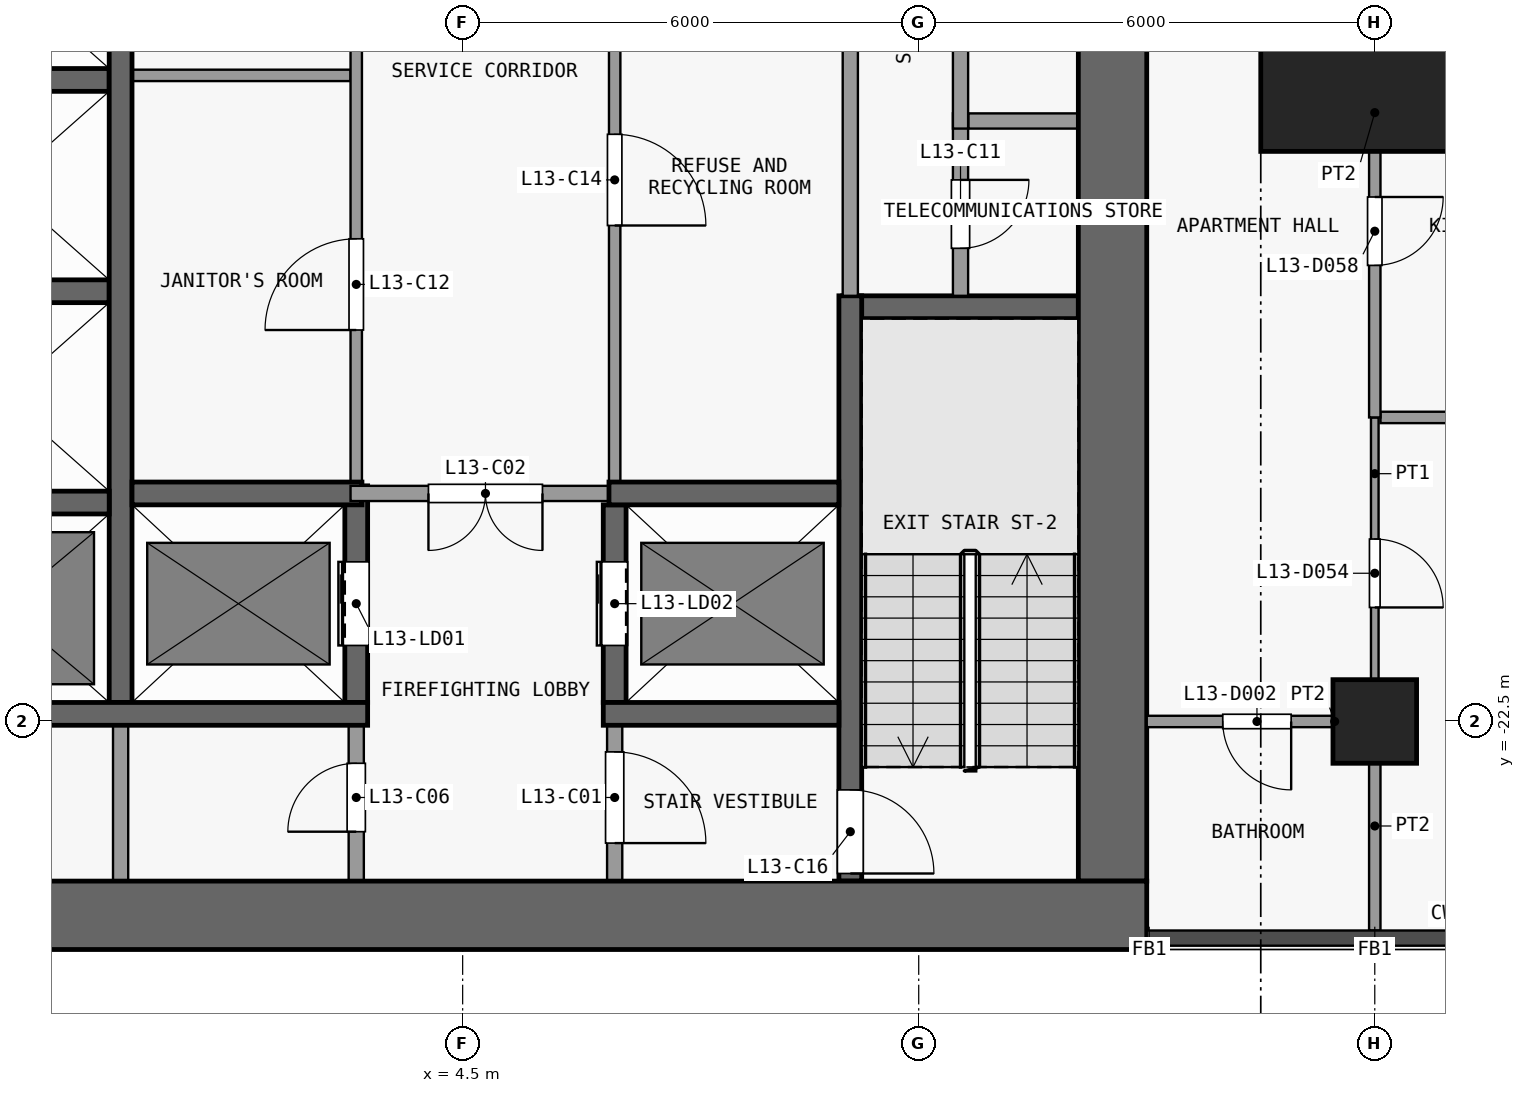
"""IFC4 building model, lengths in metres.
Left out: names, types, materials, properties, quantities, classifications, styles, units other than length and angle.
Written with IfcOpenShell. Run it as: python <this file> out.ifc"""

import sys

from ifc_helpers import new_model, si_unit, direction, frame, frame_2d, origin, origin_2d, place, context, subcontext, project, spatial, rectangle, extrude, element, fill, save


model = new_model("IFC4")
c1 = context("Model", 3, precision=1e-05, world=origin(), true_north=direction((0.0, 1.0)))
c2 = subcontext(c1, "Body", "Model", "MODEL_VIEW")
j1 = project(units=[si_unit("LENGTHUNIT", "METRE"), si_unit("PLANEANGLEUNIT", "RADIAN")], contexts=[c1])
p1 = place(None, origin())
s1 = spatial("IfcSite", under=j1, at=p1, CompositionType="ELEMENT")
p2 = place(p1, origin())
s2 = spatial("IfcBuilding", under=s1, at=p2, CompositionType="ELEMENT")
p3 = place(p2, frame((0.0, 0.0, 57.7)))
s3 = spatial("IfcBuildingStorey", under=s2, at=p3, CompositionType="ELEMENT", Elevation=57.7)
p4 = place(p3, frame((16.5, -22.5, 0.0), z_axis=(0.0, 0.0, 1.0), x_axis=(1.0, 0.0, 0.0)))
e1 = element("IfcColumn", 1, at=p4, inside=s3, PredefinedType="COLUMN", context=c2, shape_type="SweptSolid", body=[
    extrude(rectangle(XDim=1.1, YDim=1.1, at=origin_2d()), origin(), (0.0, 0.0, 1.0), 3.6),
])
p5 = place(p3, frame((16.5, -13.5, 0.0), z_axis=(0.0, 0.0, 1.0), x_axis=(1.0, 0.0, 0.0)))
e2 = element("IfcColumn", 2, at=p5, inside=s3, PredefinedType="COLUMN", context=c2, shape_type="SweptSolid", body=[
    extrude(rectangle(XDim=3.0, YDim=3.0, at=origin_2d()), origin(), (0.0, 0.0, 1.0), 3.6),
])
p6 = place(p3, frame((-13.5, -25.05, 0.0), z_axis=(0.0, 0.0, 1.0), x_axis=(1.0, 0.0, 0.0)))
e3 = element("IfcWall", 3, at=p6, inside=s3, PredefinedType="SHEAR", context=c2, shape_type="SweptSolid", body=[
    extrude(rectangle(XDim=27.0, YDim=0.9, at=frame_2d((13.5, 0.0))), origin(), (0.0, 0.0, 1.0), 3.3),
])
p7 = place(p3, frame((13.05, -24.6, 0.0), z_axis=(0.0, 0.0, 1.0), x_axis=(0.0, 1.0, 0.0)))
e4 = element("IfcWall", 4, at=p7, inside=s3, PredefinedType="SHEAR", context=c2, shape_type="SweptSolid", body=[
    extrude(rectangle(XDim=16.1, YDim=0.9, at=frame_2d((8.05, 0.0))), origin(), (0.0, 0.0, 1.0), 3.3),
])
p8 = place(p3, frame((-2.95, -22.4, 0.0), z_axis=(0.0, 0.0, 1.0), x_axis=(1.0, 0.0, 0.0)))
e5 = element("IfcWall", 5, at=p8, inside=s3, PredefinedType="SHEAR", context=c2, shape_type="SweptSolid", body=[
    extrude(rectangle(XDim=6.2, YDim=0.3, at=frame_2d((3.1, 0.0))), origin(), (0.0, 0.0, 1.0), 3.3),
])
p9 = place(p3, frame((6.35, -22.4, 0.0), z_axis=(0.0, 0.0, 1.0), x_axis=(1.0, 0.0, 0.0)))
e6 = element("IfcWall", 6, at=p9, inside=s3, PredefinedType="SHEAR", context=c2, shape_type="SweptSolid", body=[
    extrude(rectangle(XDim=3.1, YDim=0.3, at=frame_2d((1.55, 0.0))), origin(), (0.0, 0.0, 1.0), 3.3),
])
p10 = place(p3, frame((-2.95, -19.62, 0.0), z_axis=(0.0, 0.0, 1.0), x_axis=(1.0, 0.0, 0.0)))
e7 = element("IfcWall", 7, at=p10, inside=s3, PredefinedType="SHEAR", context=c2, shape_type="SweptSolid", body=[
    extrude(rectangle(XDim=2.8, YDim=0.3, at=frame_2d((1.4, 0.0))), origin(), (0.0, 0.0, 1.0), 3.3),
])
p11 = place(p3, frame((0.15, -19.5, 0.0), z_axis=(0.0, 0.0, 1.0), x_axis=(1.0, 0.0, 0.0)))
e8 = element("IfcWall", 8, at=p11, inside=s3, PredefinedType="SHEAR", context=c2, shape_type="SweptSolid", body=[
    extrude(rectangle(XDim=3.025, YDim=0.3, at=frame_2d((1.513, 0.0))), origin(), (0.0, 0.0, 1.0), 3.3),
])
p12 = place(p3, frame((6.575, -19.5, 0.0), z_axis=(0.0, 0.0, 1.0), x_axis=(-1.0, 0.0, 0.0)))
e9 = element("IfcWall", 9, at=p12, inside=s3, PredefinedType="PARTITIONING", context=c2, shape_type="SweptSolid", body=[
    extrude(rectangle(XDim=3.55, YDim=0.2, at=frame_2d((1.775, 0.0))), origin(), (0.0, 0.0, 1.0), 3.3),
])
p13 = place(p12, frame((1.025, 0.0, 0.0)))
e10 = element("IfcOpeningElement", 10, at=p13, cuts=e9, PredefinedType="OPENING", context=c2, shape_type="SweptSolid", body=[
    extrude(rectangle(XDim=1.5, YDim=2.1, at=frame_2d((0.75, 1.05))), frame((0.0, 0.11, 0.0), z_axis=(0.0, -1.0, 0.0), x_axis=(1.0, 0.0, 0.0)), (0.0, 0.0, 1.0), 0.22),
])
p14 = place(p3, frame((6.425, -19.5, 0.0), z_axis=(0.0, 0.0, 1.0), x_axis=(1.0, 0.0, 0.0)))
e11 = element("IfcWall", 11, at=p14, inside=s3, PredefinedType="SHEAR", context=c2, shape_type="SweptSolid", body=[
    extrude(rectangle(XDim=3.025, YDim=0.3, at=frame_2d((1.512, 0.0))), origin(), (0.0, 0.0, 1.0), 3.3),
])
p15 = place(p3, frame((9.5, -17.05, 0.0), z_axis=(0.0, 0.0, 1.0), x_axis=(1.0, 0.0, 0.0)))
e12 = element("IfcWall", 12, at=p15, inside=s3, PredefinedType="SHEAR", context=c2, shape_type="SweptSolid", body=[
    extrude(rectangle(XDim=3.1, YDim=0.3, at=frame_2d((1.55, 0.0))), origin(), (0.0, 0.0, 1.0), 3.3),
])
p16 = place(p3, frame((-2.95, -16.84, 0.0), z_axis=(0.0, 0.0, 1.0), x_axis=(1.0, 0.0, 0.0)))
e13 = element("IfcWall", 13, at=p16, inside=s3, PredefinedType="SHEAR", context=c2, shape_type="SweptSolid", body=[
    extrude(rectangle(XDim=2.8, YDim=0.3, at=frame_2d((1.4, 0.0))), origin(), (0.0, 0.0, 1.0), 3.3),
])
p17 = place(p3, frame((11.15, -14.6, 0.0), z_axis=(0.0, 0.0, 1.0), x_axis=(1.0, 0.0, 0.0)))
e14 = element("IfcWall", 14, at=p17, inside=s3, PredefinedType="PARTITIONING", context=c2, shape_type="SweptSolid", body=[
    extrude(rectangle(XDim=1.45, YDim=0.2, at=frame_2d((0.725, 0.0))), origin(), (0.0, 0.0, 1.0), 3.3),
])
p18 = place(p3, frame((-2.95, -14.06, 0.0), z_axis=(0.0, 0.0, 1.0), x_axis=(1.0, 0.0, 0.0)))
e15 = element("IfcWall", 15, at=p18, inside=s3, PredefinedType="SHEAR", context=c2, shape_type="SweptSolid", body=[
    extrude(rectangle(XDim=2.8, YDim=0.3, at=frame_2d((1.4, 0.0))), origin(), (0.0, 0.0, 1.0), 3.3),
])
p19 = place(p3, frame((0.15, -14.0, 0.0), z_axis=(0.0, 0.0, 1.0), x_axis=(1.0, 0.0, 0.0)))
e16 = element("IfcWall", 16, at=p19, inside=s3, PredefinedType="PARTITIONING", context=c2, shape_type="SweptSolid", body=[
    extrude(rectangle(XDim=2.875, YDim=0.15, at=frame_2d((1.438, 0.0))), origin(), (0.0, 0.0, 1.0), 3.3),
])
p20 = place(p3, frame((0.0, -24.6, 0.0), z_axis=(0.0, 0.0, 1.0), x_axis=(0.0, 1.0, 0.0)))
e17 = element("IfcWall", 17, at=p20, inside=s3, PredefinedType="PARTITIONING", context=c2, shape_type="SweptSolid", body=[
    extrude(rectangle(XDim=2.05, YDim=0.2, at=frame_2d((1.025, 0.0))), origin(), (0.0, 0.0, 1.0), 3.3),
])
p21 = place(p3, frame((0.0, -22.25, 0.0), z_axis=(0.0, 0.0, 1.0), x_axis=(0.0, 1.0, 0.0)))
e18 = element("IfcWall", 18, at=p21, inside=s3, PredefinedType="SHEAR", context=c2, shape_type="SweptSolid", body=[
    extrude(rectangle(XDim=13.75, YDim=0.3, at=frame_2d((6.875, 0.0))), origin(), (0.0, 0.0, 1.0), 3.3),
])
p22 = place(p3, frame((3.1, -24.6, 0.0), z_axis=(0.0, 0.0, 1.0), x_axis=(0.0, 1.0, 0.0)))
e19 = element("IfcWall", 19, at=p22, inside=s3, PredefinedType="PARTITIONING", context=c2, shape_type="SweptSolid", body=[
    extrude(rectangle(XDim=2.05, YDim=0.2, at=frame_2d((1.025, 0.0))), origin(), (0.0, 0.0, 1.0), 3.3),
])
p23 = place(p22, frame((0.65, 0.0, 0.0)))
e20 = element("IfcOpeningElement", 20, at=p23, cuts=e19, PredefinedType="OPENING", context=c2, shape_type="SweptSolid", body=[
    extrude(rectangle(XDim=0.9, YDim=2.1, at=frame_2d((0.45, 1.05))), frame((0.0, 0.11, 0.0), z_axis=(0.0, -1.0, 0.0), x_axis=(1.0, 0.0, 0.0)), (0.0, 0.0, 1.0), 0.22),
])
p24 = place(p3, frame((3.1, -22.25, 0.0), z_axis=(0.0, 0.0, 1.0), x_axis=(0.0, 1.0, 0.0)))
e21 = element("IfcWall", 21, at=p24, inside=s3, PredefinedType="SHEAR", context=c2, shape_type="SweptSolid", body=[
    extrude(rectangle(XDim=2.85, YDim=0.3, at=frame_2d((1.425, 0.0))), origin(), (0.0, 0.0, 1.0), 3.3),
])
p25 = place(p24, frame((0.75, 0.0, 0.0)))
e22 = element("IfcOpeningElement", 22, at=p25, cuts=e21, PredefinedType="OPENING", context=c2, shape_type="SweptSolid", body=[
    extrude(rectangle(XDim=1.1, YDim=2.1, at=frame_2d((0.55, 1.05))), frame((0.0, 0.16, 0.0), z_axis=(0.0, -1.0, 0.0), x_axis=(1.0, 0.0, 0.0)), (0.0, 0.0, 1.0), 0.32),
])
p26 = place(p3, frame((3.1, -19.4, 0.0), z_axis=(0.0, 0.0, 1.0), x_axis=(0.0, 1.0, 0.0)))
e23 = element("IfcWall", 23, at=p26, inside=s3, PredefinedType="PARTITIONING", context=c2, shape_type="SweptSolid", body=[
    extrude(rectangle(XDim=10.9, YDim=0.15, at=frame_2d((5.45, 0.0))), origin(), (0.0, 0.0, 1.0), 3.3),
])
p27 = place(p26, frame((2.05, 0.0, 0.0)))
e24 = element("IfcOpeningElement", 24, at=p27, cuts=e23, PredefinedType="OPENING", context=c2, shape_type="SweptSolid", body=[
    extrude(rectangle(XDim=1.2, YDim=2.1, at=frame_2d((0.6, 1.05))), frame((0.0, 0.085, 0.0), z_axis=(0.0, -1.0, 0.0), x_axis=(1.0, 0.0, 0.0)), (0.0, 0.0, 1.0), 0.17),
])
p28 = place(p26, frame((7.55, 0.0, 0.0)))
e25 = element("IfcOpeningElement", 25, at=p28, cuts=e23, PredefinedType="OPENING", context=c2, shape_type="SweptSolid", body=[
    extrude(rectangle(XDim=1.2, YDim=2.1, at=frame_2d((0.6, 1.05))), frame((0.0, 0.085, 0.0), z_axis=(0.0, -1.0, 0.0), x_axis=(1.0, 0.0, 0.0)), (0.0, 0.0, 1.0), 0.17),
])
p29 = place(p3, frame((6.5, -22.55, 0.0), z_axis=(0.0, 0.0, 1.0), x_axis=(0.0, -1.0, 0.0)))
e26 = element("IfcWall", 26, at=p29, inside=s3, PredefinedType="PARTITIONING", context=c2, shape_type="SweptSolid", body=[
    extrude(rectangle(XDim=2.05, YDim=0.2, at=frame_2d((1.025, 0.0))), origin(), (0.0, 0.0, 1.0), 3.3),
])
p30 = place(p29, frame((0.35, 0.0, 0.0)))
e27 = element("IfcOpeningElement", 27, at=p30, cuts=e26, PredefinedType="OPENING", context=c2, shape_type="SweptSolid", body=[
    extrude(rectangle(XDim=1.2, YDim=2.1, at=frame_2d((0.6, 1.05))), frame((0.0, 0.11, 0.0), z_axis=(0.0, -1.0, 0.0), x_axis=(1.0, 0.0, 0.0)), (0.0, 0.0, 1.0), 0.22),
])
p31 = place(p3, frame((6.5, -22.25, 0.0), z_axis=(0.0, 0.0, 1.0), x_axis=(0.0, 1.0, 0.0)))
e28 = element("IfcWall", 28, at=p31, inside=s3, PredefinedType="SHEAR", context=c2, shape_type="SweptSolid", body=[
    extrude(rectangle(XDim=2.6, YDim=0.3, at=frame_2d((1.3, 0.0))), origin(), (0.0, 0.0, 1.0), 3.3),
])
p32 = place(p31, frame((0.75, 0.0, 0.0)))
e29 = element("IfcOpeningElement", 29, at=p32, cuts=e28, PredefinedType="OPENING", context=c2, shape_type="SweptSolid", body=[
    extrude(rectangle(XDim=1.1, YDim=2.1, at=frame_2d((0.55, 1.05))), frame((0.0, 0.16, 0.0), z_axis=(0.0, -1.0, 0.0), x_axis=(1.0, 0.0, 0.0)), (0.0, 0.0, 1.0), 0.32),
])
p33 = place(p3, frame((6.5, -11.35, 0.0), z_axis=(0.0, 0.0, 1.0), x_axis=(0.0, -1.0, 0.0)))
e30 = element("IfcWall", 30, at=p33, inside=s3, PredefinedType="PARTITIONING", context=c2, shape_type="SweptSolid", body=[
    extrude(rectangle(XDim=8.0, YDim=0.15, at=frame_2d((4.0, 0.0))), origin(), (0.0, 0.0, 1.0), 3.3),
])
p34 = place(p33, frame((3.425, 0.0, 0.0)))
e31 = element("IfcOpeningElement", 31, at=p34, cuts=e30, PredefinedType="OPENING", context=c2, shape_type="SweptSolid", body=[
    extrude(rectangle(XDim=1.2, YDim=2.1, at=frame_2d((0.6, 1.05))), frame((0.0, 0.085, 0.0), z_axis=(0.0, -1.0, 0.0), x_axis=(1.0, 0.0, 0.0)), (0.0, 0.0, 1.0), 0.17),
])
p35 = place(p3, frame((9.6, -16.9, 0.0), z_axis=(0.0, 0.0, 1.0), x_axis=(0.0, -1.0, 0.0)))
e32 = element("IfcWall", 32, at=p35, inside=s3, PredefinedType="SHEAR", context=c2, shape_type="SweptSolid", body=[
    extrude(rectangle(XDim=7.7, YDim=0.3, at=frame_2d((3.85, 0.0))), origin(), (0.0, 0.0, 1.0), 3.3),
])
p36 = place(p35, frame((6.5, 0.0, 0.0)))
e33 = element("IfcOpeningElement", 33, at=p36, cuts=e32, PredefinedType="OPENING", context=c2, shape_type="SweptSolid", body=[
    extrude(rectangle(XDim=1.1, YDim=2.1, at=frame_2d((0.55, 1.05))), frame((0.0, 0.16, 0.0), z_axis=(0.0, -1.0, 0.0), x_axis=(1.0, 0.0, 0.0)), (0.0, 0.0, 1.0), 0.32),
])
p37 = place(p3, frame((9.6, -16.9, 0.0), z_axis=(0.0, 0.0, 1.0), x_axis=(0.0, 1.0, 0.0)))
e34 = element("IfcWall", 34, at=p37, inside=s3, PredefinedType="PARTITIONING", context=c2, shape_type="SweptSolid", body=[
    extrude(rectangle(XDim=5.75, YDim=0.2, at=frame_2d((2.875, 0.0))), origin(), (0.0, 0.0, 1.0), 3.3),
])
p38 = place(p3, frame((11.05, -14.5, 0.0), z_axis=(0.0, 0.0, 1.0), x_axis=(0.0, -1.0, 0.0)))
e35 = element("IfcWall", 35, at=p38, inside=s3, PredefinedType="PARTITIONING", context=c2, shape_type="SweptSolid", body=[
    extrude(rectangle(XDim=2.4, YDim=0.2, at=frame_2d((1.2, 0.0))), origin(), (0.0, 0.0, 1.0), 3.3),
])
p39 = place(p38, frame((0.875, 0.0, 0.0)))
e36 = element("IfcOpeningElement", 36, at=p39, cuts=e35, PredefinedType="OPENING", context=c2, shape_type="SweptSolid", body=[
    extrude(rectangle(XDim=0.9, YDim=2.1, at=frame_2d((0.45, 1.05))), frame((0.0, 0.11, 0.0), z_axis=(0.0, -1.0, 0.0), x_axis=(1.0, 0.0, 0.0)), (0.0, 0.0, 1.0), 0.22),
])
p40 = place(p3, frame((11.05, -8.5, 0.0), z_axis=(0.0, 0.0, 1.0), x_axis=(0.0, -1.0, 0.0)))
e37 = element("IfcWall", 37, at=p40, inside=s3, PredefinedType="PARTITIONING", context=c2, shape_type="SweptSolid", body=[
    extrude(rectangle(XDim=6.2, YDim=0.2, at=frame_2d((3.1, 0.0))), origin(), (0.0, 0.0, 1.0), 3.3),
])
p41 = place(p40, frame((2.6, 0.0, 0.0)))
e38 = element("IfcOpeningElement", 38, at=p41, cuts=e37, PredefinedType="OPENING", context=c2, shape_type="SweptSolid", body=[
    extrude(rectangle(XDim=0.9, YDim=2.1, at=frame_2d((0.45, 1.05))), frame((0.0, 0.11, 0.0), z_axis=(0.0, -1.0, 0.0), x_axis=(1.0, 0.0, 0.0)), (0.0, 0.0, 1.0), 0.22),
])
p42 = place(p3, frame((13.5, -22.5, 0.0), z_axis=(0.0, 0.0, 1.0), x_axis=(1.0, 0.0, 0.0)))
e39 = element("IfcWall", 39, at=p42, inside=s3, PredefinedType="PARTITIONING", context=c2, shape_type="SweptSolid", body=[
    extrude(rectangle(XDim=2.925, YDim=0.15, at=frame_2d((1.462, 0.0))), origin(), (0.0, 0.0, 1.0), 3.3),
])
p43 = place(p42, frame((1.0, 0.0, 0.0)))
e40 = element("IfcOpeningElement", 40, at=p43, cuts=e39, PredefinedType="OPENING", context=c2, shape_type="SweptSolid", body=[
    extrude(rectangle(XDim=0.9, YDim=2.1, at=frame_2d((0.45, 1.05))), frame((0.0, 0.085, 0.0), z_axis=(0.0, -1.0, 0.0), x_axis=(1.0, 0.0, 0.0)), (0.0, 0.0, 1.0), 0.17),
])
p44 = place(p3, frame((16.575, -18.5, 0.0), z_axis=(0.0, 0.0, 1.0), x_axis=(1.0, 0.0, 0.0)))
e41 = element("IfcWall", 41, at=p44, inside=s3, PredefinedType="PARTITIONING", context=c2, shape_type="SweptSolid", body=[
    extrude(rectangle(XDim=2.425, YDim=0.15, at=frame_2d((1.212, 0.0))), origin(), (0.0, 0.0, 1.0), 3.3),
])
p45 = place(p3, frame((16.5, -22.5, 0.0), z_axis=(0.0, 0.0, 1.0), x_axis=(0.0, 1.0, 0.0)))
e42 = element("IfcWall", 42, at=p45, inside=s3, PredefinedType="PARTITIONING", context=c2, shape_type="SweptSolid", body=[
    extrude(rectangle(XDim=4.0, YDim=0.1, at=frame_2d((2.0, 0.0))), origin(), (0.0, 0.0, 1.0), 3.3),
])
p46 = place(p45, frame((1.5, 0.0, 0.0)))
e43 = element("IfcOpeningElement", 43, at=p46, cuts=e42, PredefinedType="OPENING", context=c2, shape_type="SweptSolid", body=[
    extrude(rectangle(XDim=0.9, YDim=2.1, at=frame_2d((0.45, 1.05))), frame((0.0, 0.06, 0.0), z_axis=(0.0, -1.0, 0.0), x_axis=(1.0, 0.0, 0.0)), (0.0, 0.0, 1.0), 0.12),
])
p47 = place(p3, frame((16.5, -25.25, 0.0), z_axis=(0.0, 0.0, 1.0), x_axis=(0.0, 1.0, 0.0)))
e44 = element("IfcWall", 44, at=p47, inside=s3, PredefinedType="PARTITIONING", context=c2, shape_type="SweptSolid", body=[
    extrude(rectangle(XDim=2.75, YDim=0.15, at=frame_2d((1.375, 0.0))), origin(), (0.0, 0.0, 1.0), 3.3),
])
p48 = place(p3, frame((16.5, -18.5, 0.0), z_axis=(0.0, 0.0, 1.0), x_axis=(0.0, 1.0, 0.0)))
e45 = element("IfcWall", 45, at=p48, inside=s3, PredefinedType="PARTITIONING", context=c2, shape_type="SweptSolid", body=[
    extrude(rectangle(XDim=5.0, YDim=0.15, at=frame_2d((2.5, 0.0))), origin(), (0.0, 0.0, 1.0), 3.3),
])
p49 = place(p48, frame((2.0, 0.0, 0.0)))
e46 = element("IfcOpeningElement", 46, at=p49, cuts=e45, PredefinedType="OPENING", context=c2, shape_type="SweptSolid", body=[
    extrude(rectangle(XDim=0.9, YDim=2.1, at=frame_2d((0.45, 1.05))), frame((0.0, 0.085, 0.0), z_axis=(0.0, -1.0, 0.0), x_axis=(1.0, 0.0, 0.0)), (0.0, 0.0, 1.0), 0.17),
])
p50 = place(p25, origin())
e47 = element("IfcDoor", 47, at=p50, inside=s3, OperationType="DOUBLE_DOOR_SLIDING", PredefinedType="DOOR", context=c2, shape_type="SweptSolid", body=[
    extrude(rectangle(XDim=1.1, YDim=2.1, at=frame_2d((0.55, 1.05))), frame((0.0, 0.025, 0.0), z_axis=(0.0, -1.0, 0.0), x_axis=(1.0, 0.0, 0.0)), (0.0, 0.0, 1.0), 0.05),
])
fill(e22, e47)
p51 = place(p32, origin())
e48 = element("IfcDoor", 48, at=p51, inside=s3, OperationType="DOUBLE_DOOR_SLIDING", PredefinedType="DOOR", context=c2, shape_type="SweptSolid", body=[
    extrude(rectangle(XDim=1.1, YDim=2.1, at=frame_2d((0.55, 1.05))), frame((0.0, 0.025, 0.0), z_axis=(0.0, -1.0, 0.0), x_axis=(1.0, 0.0, 0.0)), (0.0, 0.0, 1.0), 0.05),
])
fill(e29, e48)
p52 = place(p30, origin())
e49 = element("IfcDoor", 49, at=p52, inside=s3, OperationType="SINGLE_SWING_RIGHT", PredefinedType="DOOR", context=c2, shape_type="SweptSolid", body=[
    extrude(rectangle(XDim=1.2, YDim=2.1, at=frame_2d((0.6, 1.05))), frame((0.0, 0.025, 0.0), z_axis=(0.0, -1.0, 0.0), x_axis=(1.0, 0.0, 0.0)), (0.0, 0.0, 1.0), 0.05),
])
fill(e27, e49)
p53 = place(p13, origin())
e50 = element("IfcDoor", 50, at=p53, inside=s3, OperationType="DOUBLE_DOOR_SINGLE_SWING", PredefinedType="DOOR", context=c2, shape_type="SweptSolid", body=[
    extrude(rectangle(XDim=1.5, YDim=2.1, at=frame_2d((0.75, 1.05))), frame((0.0, 0.025, 0.0), z_axis=(0.0, -1.0, 0.0), x_axis=(1.0, 0.0, 0.0)), (0.0, 0.0, 1.0), 0.05),
])
fill(e10, e50)
p54 = place(p23, origin())
e51 = element("IfcDoor", 51, at=p54, inside=s3, OperationType="SINGLE_SWING_LEFT", PredefinedType="DOOR", context=c2, shape_type="SweptSolid", body=[
    extrude(rectangle(XDim=0.9, YDim=2.1, at=frame_2d((0.45, 1.05))), frame((0.0, 0.025, 0.0), z_axis=(0.0, -1.0, 0.0), x_axis=(1.0, 0.0, 0.0)), (0.0, 0.0, 1.0), 0.05),
])
fill(e20, e51)
p55 = place(p39, origin())
e52 = element("IfcDoor", 52, at=p55, inside=s3, OperationType="SINGLE_SWING_LEFT", PredefinedType="DOOR", context=c2, shape_type="SweptSolid", body=[
    extrude(rectangle(XDim=0.9, YDim=2.1, at=frame_2d((0.45, 1.05))), frame((0.0, 0.025, 0.0), z_axis=(0.0, -1.0, 0.0), x_axis=(1.0, 0.0, 0.0)), (0.0, 0.0, 1.0), 0.05),
])
fill(e36, e52)
p56 = place(p27, origin())
e53 = element("IfcDoor", 53, at=p56, inside=s3, OperationType="SINGLE_SWING_LEFT", PredefinedType="DOOR", context=c2, shape_type="SweptSolid", body=[
    extrude(rectangle(XDim=1.2, YDim=2.1, at=frame_2d((0.6, 1.05))), frame((0.0, 0.025, 0.0), z_axis=(0.0, -1.0, 0.0), x_axis=(1.0, 0.0, 0.0)), (0.0, 0.0, 1.0), 0.05),
])
fill(e24, e53)
p57 = place(p34, origin())
e54 = element("IfcDoor", 54, at=p57, inside=s3, OperationType="SINGLE_SWING_RIGHT", PredefinedType="DOOR", context=c2, shape_type="SweptSolid", body=[
    extrude(rectangle(XDim=1.2, YDim=2.1, at=frame_2d((0.6, 1.05))), frame((0.0, 0.025, 0.0), z_axis=(0.0, -1.0, 0.0), x_axis=(1.0, 0.0, 0.0)), (0.0, 0.0, 1.0), 0.05),
])
fill(e31, e54)
p58 = place(p36, origin())
e55 = element("IfcDoor", 55, at=p58, inside=s3, OperationType="SINGLE_SWING_RIGHT", PredefinedType="DOOR", context=c2, shape_type="SweptSolid", body=[
    extrude(rectangle(XDim=1.1, YDim=2.1, at=frame_2d((0.55, 1.05))), frame((0.0, 0.025, 0.0), z_axis=(0.0, -1.0, 0.0), x_axis=(1.0, 0.0, 0.0)), (0.0, 0.0, 1.0), 0.05),
])
fill(e33, e55)
p59 = place(p43, origin())
e56 = element("IfcDoor", 56, at=p59, inside=s3, OperationType="SINGLE_SWING_RIGHT", PredefinedType="DOOR", context=c2, shape_type="SweptSolid", body=[
    extrude(rectangle(XDim=0.9, YDim=2.1, at=frame_2d((0.45, 1.05))), frame((0.0, 0.025, 0.0), z_axis=(0.0, -1.0, 0.0), x_axis=(1.0, 0.0, 0.0)), (0.0, 0.0, 1.0), 0.05),
])
fill(e40, e56)
p60 = place(p46, origin())
e57 = element("IfcDoor", 57, at=p60, inside=s3, OperationType="SINGLE_SWING_LEFT", PredefinedType="DOOR", context=c2, shape_type="SweptSolid", body=[
    extrude(rectangle(XDim=0.9, YDim=2.1, at=frame_2d((0.45, 1.05))), frame((0.0, 0.025, 0.0), z_axis=(0.0, -1.0, 0.0), x_axis=(1.0, 0.0, 0.0)), (0.0, 0.0, 1.0), 0.05),
])
fill(e43, e57)
p61 = place(p49, origin())
e58 = element("IfcDoor", 58, at=p61, inside=s3, OperationType="SINGLE_SWING_RIGHT", PredefinedType="DOOR", context=c2, shape_type="SweptSolid", body=[
    extrude(rectangle(XDim=0.9, YDim=2.1, at=frame_2d((0.45, 1.05))), frame((0.0, 0.025, 0.0), z_axis=(0.0, -1.0, 0.0), x_axis=(1.0, 0.0, 0.0)), (0.0, 0.0, 1.0), 0.05),
])
fill(e46, e58)
save(model, sys.argv[1])
